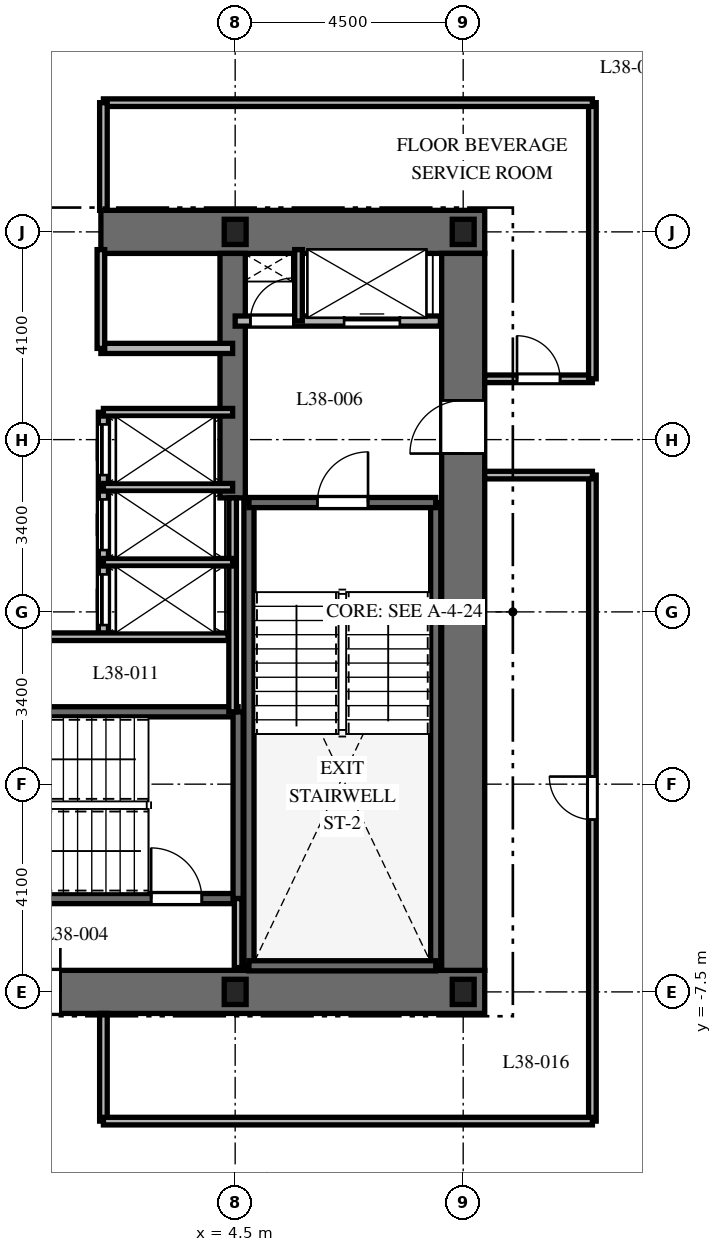
"""IFC4 building model, lengths in metres.
Left out: names, types, materials, properties, quantities, classifications, styles, units other than length and angle.
Written with IfcOpenShell. Run it as: python <this file> out.ifc"""

import sys

from ifc_helpers import new_model, si_unit, direction, frame, frame_2d, origin, origin_2d, place, context, subcontext, project, spatial, rectangle, i_section, extrude, element, fill, save


model = new_model("IFC4")
c1 = context("Model", 3, precision=1e-05, world=origin(), true_north=direction((0.0, 1.0)))
c2 = subcontext(c1, "Body", "Model", "MODEL_VIEW")
j1 = project(units=[si_unit("LENGTHUNIT", "METRE"), si_unit("PLANEANGLEUNIT", "RADIAN")], contexts=[c1])
p1 = place(None, origin())
s1 = spatial("IfcSite", under=j1, at=p1, CompositionType="ELEMENT")
p2 = place(p1, origin())
s2 = spatial("IfcBuilding", under=s1, at=p2, CompositionType="ELEMENT")
p3 = place(p2, frame((0.0, 0.0, 155.4)))
s3 = spatial("IfcBuildingStorey", under=s2, at=p3, CompositionType="ELEMENT", Elevation=155.4)
p4 = place(p3, frame((-9.425, -7.5, 0.0), z_axis=(0.0, 0.0, 1.0), x_axis=(1.0, 0.0, 0.0)))
e1 = element("IfcWall", 1, at=p4, inside=s3, PredefinedType="SHEAR", context=c2, shape_type="SweptSolid", body=[
    extrude(rectangle(XDim=18.85, YDim=0.85, at=frame_2d((9.425, 0.0))), origin(), (0.0, 0.0, 1.0), 3.7),
])
p5 = place(p4, frame((9.475, 0.0, 0.0)))
e2 = element("IfcOpeningElement", 2, at=p5, cuts=e1, PredefinedType="OPENING", context=c2, shape_type="SweptSolid", body=[
    extrude(rectangle(XDim=1.0, YDim=2.15, at=frame_2d((0.5, 1.075))), frame((0.0, 0.435, 0.0), z_axis=(0.0, -1.0, 0.0), x_axis=(1.0, 0.0, 0.0)), (0.0, 0.0, 1.0), 0.87),
])
p6 = place(p3, frame((1.85, 7.5, 0.0), z_axis=(0.0, 0.0, 1.0), x_axis=(1.0, 0.0, 0.0)))
e3 = element("IfcWall", 3, at=p6, inside=s3, PredefinedType="SHEAR", context=c2, shape_type="SweptSolid", body=[
    extrude(rectangle(XDim=7.575, YDim=0.85, at=frame_2d((3.788, 0.0))), origin(), (0.0, 0.0, 1.0), 3.7),
])
p7 = place(p3, frame((9.0, -7.075, 0.0), z_axis=(0.0, 0.0, 1.0), x_axis=(0.0, 1.0, 0.0)))
e4 = element("IfcWall", 4, at=p7, inside=s3, PredefinedType="SHEAR", context=c2, shape_type="SweptSolid", body=[
    extrude(rectangle(XDim=14.15, YDim=0.85, at=frame_2d((7.075, 0.0))), origin(), (0.0, 0.0, 1.0), 3.7),
])
p8 = place(p7, frame((10.2, 0.0, 0.0)))
e5 = element("IfcOpeningElement", 5, at=p8, cuts=e4, PredefinedType="OPENING", context=c2, shape_type="SweptSolid", body=[
    extrude(rectangle(XDim=1.05, YDim=2.15, at=frame_2d((0.525, 1.075))), frame((0.0, 0.435, 0.0), z_axis=(0.0, -1.0, 0.0), x_axis=(1.0, 0.0, 0.0)), (0.0, 0.0, 1.0), 0.87),
])
p9 = place(p3, frame((4.45, 2.25, 0.0), z_axis=(0.0, 0.0, 1.0), x_axis=(0.0, 1.0, 0.0)))
e6 = element("IfcWall", 6, at=p9, inside=s3, PredefinedType="SHEAR", context=c2, shape_type="SweptSolid", body=[
    extrude(rectangle(XDim=4.825, YDim=0.5, at=frame_2d((2.413, 0.0))), origin(), (0.0, 0.0, 1.0), 3.7),
])
for number, where, z_axis, x_axis in (
    (7, (4.772, -6.985, 0.0), (0.0, 0.0, 1.0), (0.0, 1.0, 0.0)),
    (8, (8.458, -6.985, 0.0), (0.0, 0.0, 1.0), (0.0, 1.0, 0.0)),
):
    element("IfcWall", number, at=place(p3, frame(where, z_axis=z_axis, x_axis=x_axis)), inside=s3, PredefinedType="SHEAR", context=c2, shape_type="SweptSolid", body=[
        extrude(rectangle(XDim=9.143, YDim=0.2, at=frame_2d((4.572, 0.0))), origin(), (0.0, 0.0, 1.0), 3.7),
    ])
p10 = place(p3, frame((4.772, -6.985, 0.0), z_axis=(0.0, 0.0, 1.0), x_axis=(1.0, 0.0, 0.0)))
e9 = element("IfcWall", 9, at=p10, inside=s3, PredefinedType="SHEAR", context=c2, shape_type="SweptSolid", body=[
    extrude(rectangle(XDim=3.686, YDim=0.2, at=frame_2d((1.843, 0.0))), origin(), (0.0, 0.0, 1.0), 3.7),
])
p11 = place(p3, frame((4.772, 2.158, 0.0), z_axis=(0.0, 0.0, 1.0), x_axis=(1.0, 0.0, 0.0)))
e10 = element("IfcWall", 10, at=p11, inside=s3, PredefinedType="SHEAR", context=c2, shape_type="SweptSolid", body=[
    extrude(rectangle(XDim=3.686, YDim=0.2, at=frame_2d((1.843, 0.0))), origin(), (0.0, 0.0, 1.0), 3.7),
])
p12 = place(p11, frame((1.35, 0.0, 0.0)))
e11 = element("IfcOpeningElement", 11, at=p12, cuts=e10, PredefinedType="OPENING", context=c2, shape_type="SweptSolid", body=[
    extrude(rectangle(XDim=1.0, YDim=2.15, at=frame_2d((0.5, 1.075))), frame((0.0, 0.11, 0.0), z_axis=(0.0, -1.0, 0.0), x_axis=(1.0, 0.0, 0.0)), (0.0, 0.0, 1.0), 0.22),
])
p13 = place(p3, frame((-4.608, -5.658, 0.0), z_axis=(0.0, 0.0, 1.0), x_axis=(1.0, 0.0, 0.0)))
e12 = element("IfcWall", 12, at=p13, inside=s3, PredefinedType="SHEAR", context=c2, shape_type="SweptSolid", body=[
    extrude(rectangle(XDim=9.166, YDim=0.2, at=frame_2d((4.583, 0.0))), origin(), (0.0, 0.0, 1.0), 3.7),
])
p14 = place(p13, frame((7.45, 0.0, 0.0)))
e13 = element("IfcOpeningElement", 13, at=p14, cuts=e12, PredefinedType="OPENING", context=c2, shape_type="SweptSolid", body=[
    extrude(rectangle(XDim=1.0, YDim=2.15, at=frame_2d((0.5, 1.075))), frame((0.0, 0.11, 0.0), z_axis=(0.0, -1.0, 0.0), x_axis=(1.0, 0.0, 0.0)), (0.0, 0.0, 1.0), 0.22),
])
p15 = place(p3, frame((-4.608, -1.972, 0.0), z_axis=(0.0, 0.0, 1.0), x_axis=(1.0, 0.0, 0.0)))
e14 = element("IfcWall", 14, at=p15, inside=s3, PredefinedType="SHEAR", context=c2, shape_type="SweptSolid", body=[
    extrude(rectangle(XDim=9.166, YDim=0.2, at=frame_2d((4.583, 0.0))), origin(), (0.0, 0.0, 1.0), 3.7),
])
p16 = place(p3, frame((4.558, -5.658, 0.0), z_axis=(0.0, 0.0, 1.0), x_axis=(0.0, 1.0, 0.0)))
e15 = element("IfcWall", 15, at=p16, inside=s3, PredefinedType="SHEAR", context=c2, shape_type="SweptSolid", body=[
    extrude(rectangle(XDim=3.686, YDim=0.2, at=frame_2d((1.843, 0.0))), origin(), (0.0, 0.0, 1.0), 3.7),
])
for number, where, z_axis, x_axis in (
    (16, (4.5, -7.5, 0.0), (0.0, 0.0, 1.0), (1.0, 0.0, 0.0)),
    (17, (9.0, -7.5, 0.0), (0.0, 0.0, 1.0), (1.0, 0.0, 0.0)),
    (18, (9.0, 7.5, 0.0), (0.0, 0.0, 1.0), (1.0, 0.0, 0.0)),
    (19, (4.5, 7.5, 0.0), (0.0, 0.0, 1.0), (1.0, 0.0, 0.0)),
):
    element("IfcColumn", number, at=place(p3, frame(where, z_axis=z_axis, x_axis=x_axis)), inside=s3, PredefinedType="COLUMN", context=c2, shape_type="SweptSolid", body=[
        extrude(i_section(OverallWidth=0.432, OverallDepth=0.498, WebThickness=0.056, FlangeThickness=0.089, at=origin_2d()), origin(), (0.0, 0.0, 1.0), 3.7),
    ])
p17 = place(p3, frame((4.558, -7.02, 0.0), z_axis=(0.0, 0.0, 1.0), x_axis=(0.0, 1.0, 0.0)))
e20 = element("IfcWall", 20, at=p17, inside=s3, PredefinedType="PARTITIONING", context=c2, shape_type="SweptSolid", body=[
    extrude(rectangle(XDim=1.362, YDim=0.15, at=frame_2d((0.681, 0.0))), origin(), (0.0, 0.0, 1.0), 3.4),
])
p18 = place(p3, frame((4.5, 5.74, 0.0), z_axis=(0.0, 0.0, 1.0), x_axis=(1.0, 0.0, 0.0)))
e21 = element("IfcWall", 21, at=p18, inside=s3, PredefinedType="PARTITIONING", context=c2, shape_type="SweptSolid", body=[
    extrude(rectangle(XDim=4.05, YDim=0.2, at=frame_2d((2.025, 0.0))), origin(), (0.0, 0.0, 1.0), 3.4),
])
p19 = place(p18, frame((0.3, 0.0, 0.0)))
e22 = element("IfcOpeningElement", 22, at=p19, cuts=e21, PredefinedType="OPENING", context=c2, shape_type="SweptSolid", body=[
    extrude(rectangle(XDim=0.85, YDim=2.03, at=frame_2d((0.425, 1.015))), frame((0.0, 0.11, 0.0), z_axis=(0.0, -1.0, 0.0), x_axis=(1.0, 0.0, 0.0)), (0.0, 0.0, 1.0), 0.22),
])
p20 = place(p18, frame((2.15, 0.0, 0.0)))
e23 = element("IfcOpeningElement", 23, at=p20, cuts=e21, PredefinedType="OPENING", context=c2, shape_type="SweptSolid", body=[
    extrude(rectangle(XDim=1.1, YDim=2.2, at=frame_2d((0.55, 1.1))), frame((0.0, 0.11, 0.0), z_axis=(0.0, -1.0, 0.0), x_axis=(1.0, 0.0, 0.0)), (0.0, 0.0, 1.0), 0.22),
])
p21 = place(p3, frame((5.75, 5.74, 0.0), z_axis=(0.0, 0.0, 1.0), x_axis=(0.0, 1.0, 0.0)))
e24 = element("IfcWall", 24, at=p21, inside=s3, PredefinedType="PARTITIONING", context=c2, shape_type="SweptSolid", body=[
    extrude(rectangle(XDim=1.41, YDim=0.15, at=frame_2d((0.705, 0.0))), origin(), (0.0, 0.0, 1.0), 3.4),
])
p22 = place(p3, frame((1.85, 5.2, 0.0), z_axis=(0.0, 0.0, 1.0), x_axis=(1.0, 0.0, 0.0)))
e25 = element("IfcWall", 25, at=p22, inside=s3, PredefinedType="PARTITIONING", context=c2, shape_type="SweptSolid", body=[
    extrude(rectangle(XDim=2.6, YDim=0.2, at=frame_2d((1.3, 0.0))), origin(), (0.0, 0.0, 1.0), 3.4),
])
p23 = place(p3, frame((1.85, 5.2, 0.0), z_axis=(0.0, 0.0, 1.0), x_axis=(0.0, 1.0, 0.0)))
e26 = element("IfcWall", 26, at=p23, inside=s3, PredefinedType="PARTITIONING", context=c2, shape_type="SweptSolid", body=[
    extrude(rectangle(XDim=1.95, YDim=0.15, at=frame_2d((0.975, 0.0))), origin(), (0.0, 0.0, 1.0), 3.4),
])
p24 = place(p3, frame((4.45, -1.972, 0.0), z_axis=(0.0, 0.0, 1.0), x_axis=(0.0, 1.0, 0.0)))
e27 = element("IfcWall", 27, at=p24, inside=s3, PredefinedType="PARTITIONING", context=c2, shape_type="SweptSolid", body=[
    extrude(rectangle(XDim=4.222, YDim=0.15, at=frame_2d((2.111, 0.0))), origin(), (0.0, 0.0, 1.0), 3.4),
])
p25 = place(p3, frame((1.9, -0.5, 0.0), z_axis=(0.0, 0.0, 1.0), x_axis=(0.0, 1.0, 0.0)))
e28 = element("IfcWall", 28, at=p25, inside=s3, PredefinedType="PARTITIONING", context=c2, shape_type="SweptSolid", body=[
    extrude(rectangle(XDim=4.44, YDim=0.2, at=frame_2d((2.22, 0.0))), origin(), (0.0, 0.0, 1.0), 3.4),
])
p26 = place(p25, frame((0.24, 0.0, 0.0)))
e29 = element("IfcOpeningElement", 29, at=p26, cuts=e28, PredefinedType="OPENING", context=c2, shape_type="SweptSolid", body=[
    extrude(rectangle(XDim=1.0, YDim=2.2, at=frame_2d((0.5, 1.1))), frame((0.0, 0.11, 0.0), z_axis=(0.0, -1.0, 0.0), x_axis=(1.0, 0.0, 0.0)), (0.0, 0.0, 1.0), 0.22),
])
p27 = place(p25, frame((1.72, 0.0, 0.0)))
e30 = element("IfcOpeningElement", 30, at=p27, cuts=e28, PredefinedType="OPENING", context=c2, shape_type="SweptSolid", body=[
    extrude(rectangle(XDim=1.0, YDim=2.2, at=frame_2d((0.5, 1.1))), frame((0.0, 0.11, 0.0), z_axis=(0.0, -1.0, 0.0), x_axis=(1.0, 0.0, 0.0)), (0.0, 0.0, 1.0), 0.22),
])
p28 = place(p25, frame((3.2, 0.0, 0.0)))
e31 = element("IfcOpeningElement", 31, at=p28, cuts=e28, PredefinedType="OPENING", context=c2, shape_type="SweptSolid", body=[
    extrude(rectangle(XDim=1.0, YDim=2.2, at=frame_2d((0.5, 1.1))), frame((0.0, 0.11, 0.0), z_axis=(0.0, -1.0, 0.0), x_axis=(1.0, 0.0, 0.0)), (0.0, 0.0, 1.0), 0.22),
])
for number, where, z_axis, x_axis in (
    (32, (1.9, 3.94, 0.0), (0.0, 0.0, 1.0), (1.0, 0.0, 0.0)),
    (33, (1.9, 0.98, 0.0), (0.0, 0.0, 1.0), (1.0, 0.0, 0.0)),
    (34, (1.9, 2.46, 0.0), (0.0, 0.0, 1.0), (1.0, 0.0, 0.0)),
):
    element("IfcWall", number, at=place(p3, frame(where, z_axis=z_axis, x_axis=x_axis)), inside=s3, PredefinedType="PARTITIONING", context=c2, shape_type="SweptSolid", body=[
        extrude(rectangle(XDim=2.55, YDim=0.15, at=frame_2d((1.275, 0.0))), origin(), (0.0, 0.0, 1.0), 3.4),
    ])
p29 = place(p3, frame((-4.36, -0.49, 0.0), z_axis=(0.0, 0.0, 1.0), x_axis=(1.0, 0.0, 0.0)))
e35 = element("IfcWall", 35, at=p29, inside=s3, PredefinedType="PARTITIONING", context=c2, shape_type="SweptSolid", body=[
    extrude(rectangle(XDim=8.72, YDim=0.15, at=frame_2d((4.36, 0.0))), origin(), (0.0, 0.0, 1.0), 3.4),
])
p30 = place(p29, frame((3.86, 0.0, 0.0)))
e36 = element("IfcOpeningElement", 36, at=p30, cuts=e35, PredefinedType="OPENING", context=c2, shape_type="SweptSolid", body=[
    extrude(rectangle(XDim=0.9, YDim=2.03, at=frame_2d((0.45, 1.015))), frame((0.0, 0.085, 0.0), z_axis=(0.0, -1.0, 0.0), x_axis=(1.0, 0.0, 0.0)), (0.0, 0.0, 1.0), 0.17),
])
p31 = place(p3, frame((11.55, -10.05, 0.0), z_axis=(0.0, 0.0, 1.0), x_axis=(0.0, 1.0, 0.0)))
e37 = element("IfcWall", 37, at=p31, inside=s3, PredefinedType="PARTITIONING", context=c2, shape_type="SweptSolid", body=[
    extrude(rectangle(XDim=12.75, YDim=0.15, at=frame_2d((6.375, 0.0))), origin(), (0.0, 0.0, 1.0), 2.84),
])
p32 = place(p31, frame((5.95, 0.0, 0.0)))
e38 = element("IfcOpeningElement", 38, at=p32, cuts=e37, PredefinedType="OPENING", context=c2, shape_type="SweptSolid", body=[
    extrude(rectangle(XDim=0.85, YDim=2.03, at=frame_2d((0.425, 1.015))), frame((0.0, 0.085, 0.0), z_axis=(0.0, -1.0, 0.0), x_axis=(1.0, 0.0, 0.0)), (0.0, 0.0, 1.0), 0.17),
])
p33 = place(p3, frame((11.55, 2.7, 0.0), z_axis=(0.0, 0.0, 1.0), x_axis=(-1.0, 0.0, 0.0)))
e39 = element("IfcWall", 39, at=p33, inside=s3, PredefinedType="PARTITIONING", context=c2, shape_type="SweptSolid", body=[
    extrude(rectangle(XDim=2.125, YDim=0.15, at=frame_2d((1.062, 0.0))), origin(), (0.0, 0.0, 1.0), 3.4),
])
p34 = place(p3, frame((9.425, 4.6, 0.0), z_axis=(0.0, 0.0, 1.0), x_axis=(1.0, 0.0, 0.0)))
e40 = element("IfcWall", 40, at=p34, inside=s3, PredefinedType="PARTITIONING", context=c2, shape_type="SweptSolid", body=[
    extrude(rectangle(XDim=2.125, YDim=0.15, at=frame_2d((1.062, 0.0))), origin(), (0.0, 0.0, 1.0), 3.4),
])
p35 = place(p34, frame((0.637, 0.0, 0.0)))
e41 = element("IfcOpeningElement", 41, at=p35, cuts=e40, PredefinedType="OPENING", context=c2, shape_type="SweptSolid", body=[
    extrude(rectangle(XDim=0.85, YDim=2.03, at=frame_2d((0.425, 1.015))), frame((0.0, 0.085, 0.0), z_axis=(0.0, -1.0, 0.0), x_axis=(1.0, 0.0, 0.0)), (0.0, 0.0, 1.0), 0.17),
])
p36 = place(p3, frame((11.55, 4.6, 0.0), z_axis=(0.0, 0.0, 1.0), x_axis=(0.0, 1.0, 0.0)))
e42 = element("IfcWall", 42, at=p36, inside=s3, PredefinedType="PARTITIONING", context=c2, shape_type="SweptSolid", body=[
    extrude(rectangle(XDim=5.45, YDim=0.15, at=frame_2d((2.725, 0.0))), origin(), (0.0, 0.0, 1.0), 2.84),
])
p37 = place(p3, frame((11.55, 10.05, 0.0), z_axis=(0.0, 0.0, 1.0), x_axis=(-1.0, 0.0, 0.0)))
e43 = element("IfcWall", 43, at=p37, inside=s3, PredefinedType="PARTITIONING", context=c2, shape_type="SweptSolid", body=[
    extrude(rectangle(XDim=9.65, YDim=0.15, at=frame_2d((4.825, 0.0))), origin(), (0.0, 0.0, 1.0), 2.84),
])
for number, where, z_axis, x_axis in (
    (44, (1.9, 10.05, 0.0), (0.0, 0.0, 1.0), (0.0, -1.0, 0.0)),
    (45, (1.9, -7.925, 0.0), (0.0, 0.0, 1.0), (0.0, -1.0, 0.0)),
):
    element("IfcWall", number, at=place(p3, frame(where, z_axis=z_axis, x_axis=x_axis)), inside=s3, PredefinedType="PARTITIONING", context=c2, shape_type="SweptSolid", body=[
        extrude(rectangle(XDim=2.125, YDim=0.15, at=frame_2d((1.062, 0.0))), origin(), (0.0, 0.0, 1.0), 3.4),
    ])
p38 = place(p3, frame((1.9, -10.05, 0.0), z_axis=(0.0, 0.0, 1.0), x_axis=(1.0, 0.0, 0.0)))
e46 = element("IfcWall", 46, at=p38, inside=s3, PredefinedType="PARTITIONING", context=c2, shape_type="SweptSolid", body=[
    extrude(rectangle(XDim=9.65, YDim=0.15, at=frame_2d((4.825, 0.0))), origin(), (0.0, 0.0, 1.0), 2.84),
])
p39 = place(p12, origin())
e47 = element("IfcDoor", 47, at=p39, inside=s3, OperationType="SINGLE_SWING_RIGHT", PredefinedType="DOOR", context=c2, shape_type="SweptSolid", body=[
    extrude(rectangle(XDim=1.0, YDim=2.15, at=frame_2d((0.5, 1.075))), frame((0.0, 0.025, 0.0), z_axis=(0.0, -1.0, 0.0), x_axis=(1.0, 0.0, 0.0)), (0.0, 0.0, 1.0), 0.05),
])
fill(e11, e47)
p40 = place(p14, origin())
e48 = element("IfcDoor", 48, at=p40, inside=s3, OperationType="SINGLE_SWING_LEFT", PredefinedType="DOOR", context=c2, shape_type="SweptSolid", body=[
    extrude(rectangle(XDim=1.0, YDim=2.15, at=frame_2d((0.5, 1.075))), frame((0.0, 0.025, 0.0), z_axis=(0.0, -1.0, 0.0), x_axis=(1.0, 0.0, 0.0)), (0.0, 0.0, 1.0), 0.05),
])
fill(e13, e48)
p41 = place(p5, origin())
e49 = element("IfcDoor", 49, at=p41, inside=s3, OperationType="SINGLE_SWING_RIGHT", PredefinedType="DOOR", context=c2, shape_type="SweptSolid", body=[
    extrude(rectangle(XDim=1.0, YDim=2.15, at=frame_2d((0.5, 1.075))), frame((0.0, 0.025, 0.0), z_axis=(0.0, -1.0, 0.0), x_axis=(1.0, 0.0, 0.0)), (0.0, 0.0, 1.0), 0.05),
])
fill(e2, e49)
p42 = place(p8, origin())
e50 = element("IfcDoor", 50, at=p42, inside=s3, OperationType="SINGLE_SWING_LEFT", PredefinedType="DOOR", context=c2, shape_type="SweptSolid", body=[
    extrude(rectangle(XDim=1.05, YDim=2.15, at=frame_2d((0.525, 1.075))), frame((0.0, 0.025, 0.0), z_axis=(0.0, -1.0, 0.0), x_axis=(1.0, 0.0, 0.0)), (0.0, 0.0, 1.0), 0.05),
])
fill(e5, e50)
p43 = place(p19, origin())
e51 = element("IfcDoor", 51, at=p43, inside=s3, OperationType="SINGLE_SWING_RIGHT", PredefinedType="DOOR", context=c2, shape_type="SweptSolid", body=[
    extrude(rectangle(XDim=0.85, YDim=2.03, at=frame_2d((0.425, 1.015))), frame((0.0, 0.025, 0.0), z_axis=(0.0, -1.0, 0.0), x_axis=(1.0, 0.0, 0.0)), (0.0, 0.0, 1.0), 0.05),
])
fill(e22, e51)
p44 = place(p20, origin())
e52 = element("IfcDoor", 52, at=p44, inside=s3, OperationType="SLIDING_TO_RIGHT", PredefinedType="DOOR", context=c2, shape_type="SweptSolid", body=[
    extrude(rectangle(XDim=1.1, YDim=2.2, at=frame_2d((0.55, 1.1))), frame((0.0, 0.025, 0.0), z_axis=(0.0, -1.0, 0.0), x_axis=(1.0, 0.0, 0.0)), (0.0, 0.0, 1.0), 0.05),
])
fill(e23, e52)
p45 = place(p26, origin())
e53 = element("IfcDoor", 53, at=p45, inside=s3, OperationType="SLIDING_TO_RIGHT", PredefinedType="DOOR", context=c2, shape_type="SweptSolid", body=[
    extrude(rectangle(XDim=1.0, YDim=2.2, at=frame_2d((0.5, 1.1))), frame((0.0, 0.025, 0.0), z_axis=(0.0, -1.0, 0.0), x_axis=(1.0, 0.0, 0.0)), (0.0, 0.0, 1.0), 0.05),
])
fill(e29, e53)
p46 = place(p27, origin())
e54 = element("IfcDoor", 54, at=p46, inside=s3, OperationType="SLIDING_TO_RIGHT", PredefinedType="DOOR", context=c2, shape_type="SweptSolid", body=[
    extrude(rectangle(XDim=1.0, YDim=2.2, at=frame_2d((0.5, 1.1))), frame((0.0, 0.025, 0.0), z_axis=(0.0, -1.0, 0.0), x_axis=(1.0, 0.0, 0.0)), (0.0, 0.0, 1.0), 0.05),
])
fill(e30, e54)
p47 = place(p28, origin())
e55 = element("IfcDoor", 55, at=p47, inside=s3, OperationType="SLIDING_TO_RIGHT", PredefinedType="DOOR", context=c2, shape_type="SweptSolid", body=[
    extrude(rectangle(XDim=1.0, YDim=2.2, at=frame_2d((0.5, 1.1))), frame((0.0, 0.025, 0.0), z_axis=(0.0, -1.0, 0.0), x_axis=(1.0, 0.0, 0.0)), (0.0, 0.0, 1.0), 0.05),
])
fill(e31, e55)
p48 = place(p35, origin())
e56 = element("IfcDoor", 56, at=p48, inside=s3, OperationType="SINGLE_SWING_LEFT", PredefinedType="DOOR", context=c2, shape_type="SweptSolid", body=[
    extrude(rectangle(XDim=0.85, YDim=2.03, at=frame_2d((0.425, 1.015))), frame((0.0, 0.025, 0.0), z_axis=(0.0, -1.0, 0.0), x_axis=(1.0, 0.0, 0.0)), (0.0, 0.0, 1.0), 0.05),
])
fill(e41, e56)
p49 = place(p32, origin())
e57 = element("IfcDoor", 57, at=p49, inside=s3, OperationType="SINGLE_SWING_RIGHT", PredefinedType="DOOR", context=c2, shape_type="SweptSolid", body=[
    extrude(rectangle(XDim=0.85, YDim=2.03, at=frame_2d((0.425, 1.015))), frame((0.0, 0.025, 0.0), z_axis=(0.0, -1.0, 0.0), x_axis=(1.0, 0.0, 0.0)), (0.0, 0.0, 1.0), 0.05),
])
fill(e38, e57)
save(model, sys.argv[1])
